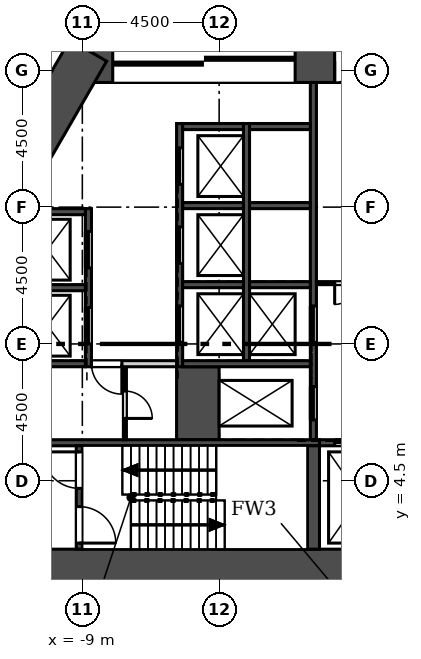
"""IFC4 building model, lengths in metres.
Left out: names, types, materials, properties, quantities, classifications, styles, units other than length and angle.
Written with IfcOpenShell. Run it as: python <this file> out.ifc"""

import sys

from ifc_helpers import new_model, si_unit, direction, frame, frame_2d, origin, place, context, subcontext, project, spatial, rectangle, extrude, element, fill, save


model = new_model("IFC4")
c1 = context("Model", 3, precision=1e-05, world=origin(), true_north=direction((0.0, 1.0)))
c2 = subcontext(c1, "Body", "Model", "MODEL_VIEW")
j1 = project(units=[si_unit("LENGTHUNIT", "METRE"), si_unit("PLANEANGLEUNIT", "RADIAN")], contexts=[c1])
p1 = place(None, origin())
s1 = spatial("IfcSite", under=j1, at=p1, CompositionType="ELEMENT")
p2 = place(p1, origin())
s2 = spatial("IfcBuilding", under=s1, at=p2, CompositionType="ELEMENT")
p3 = place(p2, frame((0.0, 0.0, 88.9)))
s3 = spatial("IfcBuildingStorey", under=s2, at=p3, CompositionType="ELEMENT", Elevation=88.9)
p4 = place(p3, frame((-14.0, 1.55, 0.0), z_axis=(0.0, 0.0, 1.0), x_axis=(1.0, 0.0, 0.0)))
e1 = element("IfcWall", 1, at=p4, inside=s3, PredefinedType="SHEAR", context=c2, shape_type="SweptSolid", body=[
    extrude(rectangle(XDim=28.0, YDim=1.4, at=frame_2d((14.0, 0.0))), origin(), (0.0, 0.0, 1.0), 7.2),
])
p5 = place(p3, frame((9.412, 18.3, 0.0), z_axis=(0.0, 0.0, 1.0), x_axis=(-1.0, 0.0, 0.0)))
e2 = element("IfcWall", 2, at=p5, inside=s3, PredefinedType="SHEAR", context=c2, shape_type="SweptSolid", body=[
    extrude(rectangle(XDim=18.823, YDim=1.4, at=frame_2d((9.412, 0.0))), origin(), (0.0, 0.0, 1.0), 7.2),
])
p6 = place(p5, frame((8.711, 0.0, 0.0)))
e3 = element("IfcOpeningElement", 3, at=p6, cuts=e2, PredefinedType="OPENING", context=c2, shape_type="SweptSolid", body=[
    extrude(rectangle(XDim=1.4, YDim=2.1, at=frame_2d((0.7, 1.05))), frame((0.0, 0.71, 0.0), z_axis=(0.0, -1.0, 0.0), x_axis=(1.0, 0.0, 0.0)), (0.0, 0.0, 1.0), 1.42),
])
p7 = place(p5, frame((11.412, 0.0, 0.0)))
e4 = element("IfcOpeningElement", 4, at=p7, cuts=e2, PredefinedType="OPENING", context=c2, shape_type="SweptSolid", body=[
    extrude(rectangle(XDim=6.0, YDim=2.4, at=frame_2d((3.0, 1.2))), frame((0.0, 0.71, 0.0), z_axis=(0.0, -1.0, 0.0), x_axis=(1.0, 0.0, 0.0)), (0.0, 0.0, 1.0), 1.42),
])
p8 = place(p5, frame((1.412, 0.0, 0.0)))
e5 = element("IfcOpeningElement", 5, at=p8, cuts=e2, PredefinedType="OPENING", context=c2, shape_type="SweptSolid", body=[
    extrude(rectangle(XDim=6.0, YDim=2.4, at=frame_2d((3.0, 1.2))), frame((0.0, 0.71, 0.0), z_axis=(0.0, -1.0, 0.0), x_axis=(1.0, 0.0, 0.0)), (0.0, 0.0, 1.0), 1.42),
])
p9 = place(p3, frame((-8.805, 18.65, 0.0), z_axis=(0.0, 0.0, 1.0), x_axis=(-0.50000187635, -0.866024320471, 0.0)))
e6 = element("IfcWall", 6, at=p9, inside=s3, PredefinedType="SHEAR", context=c2, shape_type="SweptSolid", body=[
    extrude(rectangle(XDim=9.177, YDim=1.4, at=frame_2d((4.588, 0.0))), origin(), (0.0, 0.0, 1.0), 7.2),
])
p10 = place(p3, frame((-4.353, 53.627, 0.0), z_axis=(0.0, 0.0, 1.0), x_axis=(-0.500000400847, -0.866025172355, 0.0)))
e7 = element("IfcWall", 7, at=p10, inside=s3, PredefinedType="SOLIDWALL", context=c2, shape_type="SweptSolid", body=[
    extrude(rectangle(XDim=53.021, YDim=0.34, at=frame_2d((26.51, 0.0))), origin(), (0.0, 0.0, 1.0), 6.8),
])
p11 = place(p3, frame((-8.8, 8.25, -0.3), z_axis=(0.0, 0.0, 1.0), x_axis=(0.0, 1.0, 0.0)))
e8 = element("IfcWall", 8, at=p11, inside=s3, PredefinedType="SOLIDWALL", context=c2, shape_type="SweptSolid", body=[
    extrude(rectangle(XDim=5.2, YDim=0.2, at=frame_2d((2.6, 0.0))), origin(), (0.0, 0.0, 1.0), 7.1),
])
p12 = place(p11, frame((0.75, 0.0, 0.3)))
e9 = element("IfcOpeningElement", 9, at=p12, cuts=e8, PredefinedType="OPENING", context=c2, shape_type="SweptSolid", body=[
    extrude(rectangle(XDim=1.2, YDim=2.1, at=frame_2d((0.6, 1.05))), frame((0.0, 0.11, 0.0), z_axis=(0.0, -1.0, 0.0), x_axis=(1.0, 0.0, 0.0)), (0.0, 0.0, 1.0), 0.22),
])
p13 = place(p11, frame((3.25, 0.0, 0.3)))
e10 = element("IfcOpeningElement", 10, at=p13, cuts=e8, PredefinedType="OPENING", context=c2, shape_type="SweptSolid", body=[
    extrude(rectangle(XDim=1.2, YDim=2.1, at=frame_2d((0.6, 1.05))), frame((0.0, 0.11, 0.0), z_axis=(0.0, -1.0, 0.0), x_axis=(1.0, 0.0, 0.0)), (0.0, 0.0, 1.0), 0.22),
])
p14 = place(p3, frame((-5.8, 8.25, -0.3), z_axis=(0.0, 0.0, 1.0), x_axis=(0.0, 1.0, 0.0)))
e11 = element("IfcWall", 11, at=p14, inside=s3, PredefinedType="SOLIDWALL", context=c2, shape_type="SweptSolid", body=[
    extrude(rectangle(XDim=8.0, YDim=0.2, at=frame_2d((4.0, 0.0))), origin(), (0.0, 0.0, 1.0), 7.1),
])
p15 = place(p14, frame((0.8, 0.0, 0.3)))
e12 = element("IfcOpeningElement", 12, at=p15, cuts=e11, PredefinedType="OPENING", context=c2, shape_type="SweptSolid", body=[
    extrude(rectangle(XDim=1.2, YDim=2.1, at=frame_2d((0.6, 1.05))), frame((0.0, 0.11, 0.0), z_axis=(0.0, -1.0, 0.0), x_axis=(1.0, 0.0, 0.0)), (0.0, 0.0, 1.0), 0.22),
])
p16 = place(p14, frame((3.4, 0.0, 0.3)))
e13 = element("IfcOpeningElement", 13, at=p16, cuts=e11, PredefinedType="OPENING", context=c2, shape_type="SweptSolid", body=[
    extrude(rectangle(XDim=1.2, YDim=2.1, at=frame_2d((0.6, 1.05))), frame((0.0, 0.11, 0.0), z_axis=(0.0, -1.0, 0.0), x_axis=(1.0, 0.0, 0.0)), (0.0, 0.0, 1.0), 0.22),
])
p17 = place(p14, frame((6.0, 0.0, 0.3)))
e14 = element("IfcOpeningElement", 14, at=p17, cuts=e11, PredefinedType="OPENING", context=c2, shape_type="SweptSolid", body=[
    extrude(rectangle(XDim=1.2, YDim=2.1, at=frame_2d((0.6, 1.05))), frame((0.0, 0.11, 0.0), z_axis=(0.0, -1.0, 0.0), x_axis=(1.0, 0.0, 0.0)), (0.0, 0.0, 1.0), 0.22),
])
p18 = place(p3, frame((-3.6, 8.45, -0.3), z_axis=(0.0, 0.0, 1.0), x_axis=(0.0, 1.0, 0.0)))
e15 = element("IfcWall", 15, at=p18, inside=s3, PredefinedType="SOLIDWALL", context=c2, shape_type="SweptSolid", body=[
    extrude(rectangle(XDim=7.8, YDim=0.2, at=frame_2d((3.9, 0.0))), origin(), (0.0, 0.0, 1.0), 7.1),
])
p19 = place(p3, frame((-1.4, 5.85, -0.3), z_axis=(0.0, 0.0, 1.0), x_axis=(0.0, 1.0, 0.0)))
e16 = element("IfcWall", 16, at=p19, inside=s3, PredefinedType="SOLIDWALL", context=c2, shape_type="SweptSolid", body=[
    extrude(rectangle(XDim=11.75, YDim=0.2, at=frame_2d((5.875, 0.0))), origin(), (0.0, 0.0, 1.0), 7.1),
])
p20 = place(p19, frame((3.2, 0.0, 0.3)))
e17 = element("IfcOpeningElement", 17, at=p20, cuts=e16, PredefinedType="OPENING", context=c2, shape_type="SweptSolid", body=[
    extrude(rectangle(XDim=1.2, YDim=2.1, at=frame_2d((0.6, 1.05))), frame((0.0, 0.11, 0.0), z_axis=(0.0, -1.0, 0.0), x_axis=(1.0, 0.0, 0.0)), (0.0, 0.0, 1.0), 0.22),
])
p21 = place(p19, frame((0.65, 0.0, 0.3)))
e18 = element("IfcOpeningElement", 18, at=p21, cuts=e16, PredefinedType="OPENING", context=c2, shape_type="SweptSolid", body=[
    extrude(rectangle(XDim=1.1, YDim=2.1, at=frame_2d((0.55, 1.05))), frame((0.0, 0.11, 0.0), z_axis=(0.0, -1.0, 0.0), x_axis=(1.0, 0.0, 0.0)), (0.0, 0.0, 1.0), 0.22),
])
p22 = place(p3, frame((-5.2, 5.85, -0.3), z_axis=(0.0, 0.0, 1.0), x_axis=(0.0, 1.0, 0.0)))
e19 = element("IfcWall", 19, at=p22, inside=s3, PredefinedType="SOLIDWALL", context=c2, shape_type="SweptSolid", body=[
    extrude(rectangle(XDim=2.4, YDim=1.4, at=frame_2d((1.2, 0.0))), origin(), (0.0, 0.0, 1.0), 7.1),
])
p23 = place(p3, frame((-10.9, 8.35, -0.3), z_axis=(0.0, 0.0, 1.0), x_axis=(1.0, 0.0, 0.0)))
e20 = element("IfcWall", 20, at=p23, inside=s3, PredefinedType="SOLIDWALL", context=c2, shape_type="SweptSolid", body=[
    extrude(rectangle(XDim=2.0, YDim=0.2, at=frame_2d((1.0, 0.0))), origin(), (0.0, 0.0, 1.0), 7.1),
])
p24 = place(p3, frame((-5.7, 8.35, -0.3), z_axis=(0.0, 0.0, 1.0), x_axis=(1.0, 0.0, 0.0)))
e21 = element("IfcWall", 21, at=p24, inside=s3, PredefinedType="SOLIDWALL", context=c2, shape_type="SweptSolid", body=[
    extrude(rectangle(XDim=4.2, YDim=0.2, at=frame_2d((2.1, 0.0))), origin(), (0.0, 0.0, 1.0), 7.1),
])
p25 = place(p3, frame((-12.6, 5.75, -0.3), z_axis=(0.0, 0.0, 1.0), x_axis=(1.0, 0.0, 0.0)))
e22 = element("IfcWall", 22, at=p25, inside=s3, PredefinedType="SOLIDWALL", context=c2, shape_type="SweptSolid", body=[
    extrude(rectangle(XDim=11.4, YDim=0.2, at=frame_2d((5.7, 0.0))), origin(), (0.0, 0.0, 1.0), 7.1),
])
p26 = place(p3, frame((-1.2, 5.75, -0.3), z_axis=(0.0, 0.0, 1.0), x_axis=(1.0, 0.0, 0.0)))
e23 = element("IfcWall", 23, at=p26, inside=s3, PredefinedType="SOLIDWALL", context=c2, shape_type="SweptSolid", body=[
    extrude(rectangle(XDim=2.4, YDim=0.2, at=frame_2d((1.2, 0.0))), origin(), (0.0, 0.0, 1.0), 7.1),
])
p27 = place(p26, frame((0.5, 0.0, 0.3)))
e24 = element("IfcOpeningElement", 24, at=p27, cuts=e23, PredefinedType="OPENING", context=c2, shape_type="SweptSolid", body=[
    extrude(rectangle(XDim=1.4, YDim=2.1, at=frame_2d((0.7, 1.05))), frame((0.0, 0.11, 0.0), z_axis=(0.0, -1.0, 0.0), x_axis=(1.0, 0.0, 0.0)), (0.0, 0.0, 1.0), 0.22),
])
p28 = place(p3, frame((-9.1, 2.25, -0.3), z_axis=(0.0, 0.0, 1.0), x_axis=(0.0, 1.0, 0.0)))
e25 = element("IfcWall", 25, at=p28, inside=s3, PredefinedType="SOLIDWALL", context=c2, shape_type="SweptSolid", body=[
    extrude(rectangle(XDim=3.4, YDim=0.2, at=frame_2d((1.7, 0.0))), origin(), (0.0, 0.0, 1.0), 7.1),
])
p29 = place(p28, frame((0.2, 0.0, 0.3)))
e26 = element("IfcOpeningElement", 26, at=p29, cuts=e25, PredefinedType="OPENING", context=c2, shape_type="SweptSolid", body=[
    extrude(rectangle(XDim=1.2, YDim=2.1, at=frame_2d((0.6, 1.05))), frame((0.0, 0.11, 0.0), z_axis=(0.0, -1.0, 0.0), x_axis=(1.0, 0.0, 0.0)), (0.0, 0.0, 1.0), 0.22),
])
p30 = place(p28, frame((2.0, 0.0, 0.3)))
e27 = element("IfcOpeningElement", 27, at=p30, cuts=e25, PredefinedType="OPENING", context=c2, shape_type="SweptSolid", body=[
    extrude(rectangle(XDim=1.2, YDim=2.1, at=frame_2d((0.6, 1.05))), frame((0.0, 0.11, 0.0), z_axis=(0.0, -1.0, 0.0), x_axis=(1.0, 0.0, 0.0)), (0.0, 0.0, 1.0), 0.22),
])
p31 = place(p3, frame((-1.4, 2.25, -0.3), z_axis=(0.0, 0.0, 1.0), x_axis=(0.0, 1.0, 0.0)))
e28 = element("IfcWall", 28, at=p31, inside=s3, PredefinedType="SOLIDWALL", context=c2, shape_type="SweptSolid", body=[
    extrude(rectangle(XDim=3.4, YDim=0.4, at=frame_2d((1.7, 0.0))), origin(), (0.0, 0.0, 1.0), 7.1),
])
for number, where, z_axis, x_axis in (
    (29, (-10.9, 10.85, -0.3), (0.0, 0.0, 1.0), (1.0, 0.0, 0.0)),
    (30, (-10.9, 13.35, -0.3), (0.0, 0.0, 1.0), (1.0, 0.0, 0.0)),
    (31, (-5.7, 10.95, -0.3), (0.0, 0.0, 1.0), (1.0, 0.0, 0.0)),
    (32, (-5.7, 13.55, -0.3), (0.0, 0.0, 1.0), (1.0, 0.0, 0.0)),
    (33, (-5.7, 16.15, -0.3), (0.0, 0.0, 1.0), (1.0, 0.0, 0.0)),
    (34, (-3.5, 10.95, -0.3), (0.0, 0.0, 1.0), (1.0, 0.0, 0.0)),
    (35, (-3.5, 13.55, -0.3), (0.0, 0.0, 1.0), (1.0, 0.0, 0.0)),
    (36, (-3.5, 16.15, -0.3), (0.0, 0.0, 1.0), (1.0, 0.0, 0.0)),
):
    element("IfcWall", number, at=place(p3, frame(where, z_axis=z_axis, x_axis=x_axis)), inside=s3, PredefinedType="SOLIDWALL", context=c2, shape_type="SweptSolid", body=[
        extrude(rectangle(XDim=2.0, YDim=0.2, at=frame_2d((1.0, 0.0))), origin(), (0.0, 0.0, 1.0), 7.1),
    ])
p32 = place(p3, frame((-7.6, 5.85, 0.0), z_axis=(0.0, 0.0, 1.0), x_axis=(0.0, 1.0, 0.0)))
e37 = element("IfcWall", 37, at=p32, inside=s3, PredefinedType="PARTITIONING", context=c2, shape_type="SweptSolid", body=[
    extrude(rectangle(XDim=2.4, YDim=0.1, at=frame_2d((1.2, 0.0))), origin(), (0.0, 0.0, 1.0), 6.8),
])
p33 = place(p32, frame((0.7, 0.0, 0.0)))
e38 = element("IfcOpeningElement", 38, at=p33, cuts=e37, PredefinedType="OPENING", context=c2, shape_type="SweptSolid", body=[
    extrude(rectangle(XDim=0.9, YDim=2.1, at=frame_2d((0.45, 1.05))), frame((0.0, 0.06, 0.0), z_axis=(0.0, -1.0, 0.0), x_axis=(1.0, 0.0, 0.0)), (0.0, 0.0, 1.0), 0.12),
])
p34 = place(p3, frame((-8.7, 8.35, 0.0), z_axis=(0.0, 0.0, 1.0), x_axis=(1.0, 0.0, 0.0)))
e39 = element("IfcWall", 39, at=p34, inside=s3, PredefinedType="SOLIDWALL", context=c2, shape_type="SweptSolid", body=[
    extrude(rectangle(XDim=2.8, YDim=0.2, at=frame_2d((1.4, 0.0))), origin(), (0.0, 0.0, 1.0), 6.8),
])
p35 = place(p34, origin())
e40 = element("IfcOpeningElement", 40, at=p35, cuts=e39, PredefinedType="OPENING", context=c2, shape_type="SweptSolid", body=[
    extrude(rectangle(XDim=1.0, YDim=2.1, at=frame_2d((0.5, 1.05))), frame((0.0, 0.11, 0.0), z_axis=(0.0, -1.0, 0.0), x_axis=(1.0, 0.0, 0.0)), (0.0, 0.0, 1.0), 0.22),
])
p36 = place(p3, frame((-1.3, 11.0, 0.0), z_axis=(0.0, 0.0, 1.0), x_axis=(1.0, 0.0, 0.0)))
e41 = element("IfcWall", 41, at=p36, inside=s3, PredefinedType="PARTITIONING", context=c2, shape_type="SweptSolid", body=[
    extrude(rectangle(XDim=2.6, YDim=0.1, at=frame_2d((1.3, 0.0))), origin(), (0.0, 0.0, 1.0), 6.8),
])
p37 = place(p36, frame((0.6, 0.0, 0.0)))
e42 = element("IfcOpeningElement", 42, at=p37, cuts=e41, PredefinedType="OPENING", context=c2, shape_type="SweptSolid", body=[
    extrude(rectangle(XDim=1.4, YDim=2.1, at=frame_2d((0.7, 1.05))), frame((0.0, 0.06, 0.0), z_axis=(0.0, -1.0, 0.0), x_axis=(1.0, 0.0, 0.0)), (0.0, 0.0, 1.0), 0.12),
])
p38 = place(p3, frame((-9.0, 3.95, 0.0), z_axis=(0.0, 0.0, 1.0), x_axis=(1.0, 0.0, 0.0)))
e43 = element("IfcWall", 43, at=p38, inside=s3, PredefinedType="SOLIDWALL", context=c2, shape_type="SweptSolid", body=[
    extrude(rectangle(XDim=1.6, YDim=0.2, at=frame_2d((0.8, 0.0))), origin(), (0.0, 0.0, 1.0), 6.8),
])
p39 = place(p12, origin())
e44 = element("IfcDoor", 44, at=p39, inside=s3, OperationType="SLIDING_TO_LEFT", PredefinedType="DOOR", context=c2, shape_type="SweptSolid", body=[
    extrude(rectangle(XDim=1.2, YDim=2.1, at=frame_2d((0.6, 1.05))), frame((0.0, 0.025, 0.0), z_axis=(0.0, -1.0, 0.0), x_axis=(1.0, 0.0, 0.0)), (0.0, 0.0, 1.0), 0.05),
])
fill(e9, e44)
p40 = place(p13, origin())
e45 = element("IfcDoor", 45, at=p40, inside=s3, OperationType="SLIDING_TO_LEFT", PredefinedType="DOOR", context=c2, shape_type="SweptSolid", body=[
    extrude(rectangle(XDim=1.2, YDim=2.1, at=frame_2d((0.6, 1.05))), frame((0.0, 0.025, 0.0), z_axis=(0.0, -1.0, 0.0), x_axis=(1.0, 0.0, 0.0)), (0.0, 0.0, 1.0), 0.05),
])
fill(e10, e45)
p41 = place(p15, origin())
e46 = element("IfcDoor", 46, at=p41, inside=s3, OperationType="SLIDING_TO_LEFT", PredefinedType="DOOR", context=c2, shape_type="SweptSolid", body=[
    extrude(rectangle(XDim=1.2, YDim=2.1, at=frame_2d((0.6, 1.05))), frame((0.0, 0.025, 0.0), z_axis=(0.0, -1.0, 0.0), x_axis=(1.0, 0.0, 0.0)), (0.0, 0.0, 1.0), 0.05),
])
fill(e12, e46)
p42 = place(p16, origin())
e47 = element("IfcDoor", 47, at=p42, inside=s3, OperationType="SLIDING_TO_LEFT", PredefinedType="DOOR", context=c2, shape_type="SweptSolid", body=[
    extrude(rectangle(XDim=1.2, YDim=2.1, at=frame_2d((0.6, 1.05))), frame((0.0, 0.025, 0.0), z_axis=(0.0, -1.0, 0.0), x_axis=(1.0, 0.0, 0.0)), (0.0, 0.0, 1.0), 0.05),
])
fill(e13, e47)
p43 = place(p17, origin())
e48 = element("IfcDoor", 48, at=p43, inside=s3, OperationType="SLIDING_TO_LEFT", PredefinedType="DOOR", context=c2, shape_type="SweptSolid", body=[
    extrude(rectangle(XDim=1.2, YDim=2.1, at=frame_2d((0.6, 1.05))), frame((0.0, 0.025, 0.0), z_axis=(0.0, -1.0, 0.0), x_axis=(1.0, 0.0, 0.0)), (0.0, 0.0, 1.0), 0.05),
])
fill(e14, e48)
p44 = place(p20, origin())
e49 = element("IfcDoor", 49, at=p44, inside=s3, OperationType="SLIDING_TO_LEFT", PredefinedType="DOOR", context=c2, shape_type="SweptSolid", body=[
    extrude(rectangle(XDim=1.2, YDim=2.1, at=frame_2d((0.6, 1.05))), frame((0.0, 0.025, 0.0), z_axis=(0.0, -1.0, 0.0), x_axis=(1.0, 0.0, 0.0)), (0.0, 0.0, 1.0), 0.05),
])
fill(e17, e49)
p45 = place(p21, origin())
e50 = element("IfcDoor", 50, at=p45, inside=s3, OperationType="SLIDING_TO_RIGHT", PredefinedType="DOOR", context=c2, shape_type="SweptSolid", body=[
    extrude(rectangle(XDim=1.1, YDim=2.1, at=frame_2d((0.55, 1.05))), frame((0.0, 0.025, 0.0), z_axis=(0.0, -1.0, 0.0), x_axis=(1.0, 0.0, 0.0)), (0.0, 0.0, 1.0), 0.05),
])
fill(e18, e50)
p46 = place(p27, origin())
e51 = element("IfcDoor", 51, at=p46, inside=s3, OperationType="SLIDING_TO_LEFT", PredefinedType="DOOR", context=c2, shape_type="SweptSolid", body=[
    extrude(rectangle(XDim=1.4, YDim=2.1, at=frame_2d((0.7, 1.05))), frame((0.0, 0.025, 0.0), z_axis=(0.0, -1.0, 0.0), x_axis=(1.0, 0.0, 0.0)), (0.0, 0.0, 1.0), 0.05),
])
fill(e24, e51)
p47 = place(p35, frame((1.0, 0.0, 0.0), z_axis=(0.0, 0.0, 1.0), x_axis=(-1.0, 0.0, 0.0)))
e52 = element("IfcDoor", 52, at=p47, inside=s3, OperationType="SINGLE_SWING_LEFT", PredefinedType="DOOR", context=c2, shape_type="SweptSolid", body=[
    extrude(rectangle(XDim=1.0, YDim=2.1, at=frame_2d((0.5, 1.05))), frame((0.0, 0.025, 0.0), z_axis=(0.0, -1.0, 0.0), x_axis=(1.0, 0.0, 0.0)), (0.0, 0.0, 1.0), 0.05),
])
fill(e40, e52)
p48 = place(p33, frame((0.9, 0.0, 0.0), z_axis=(0.0, 0.0, 1.0), x_axis=(-1.0, 0.0, 0.0)))
e53 = element("IfcDoor", 53, at=p48, inside=s3, OperationType="SINGLE_SWING_RIGHT", PredefinedType="DOOR", context=c2, shape_type="SweptSolid", body=[
    extrude(rectangle(XDim=0.9, YDim=2.1, at=frame_2d((0.45, 1.05))), frame((0.0, 0.025, 0.0), z_axis=(0.0, -1.0, 0.0), x_axis=(1.0, 0.0, 0.0)), (0.0, 0.0, 1.0), 0.05),
])
fill(e38, e53)
p49 = place(p29, frame((1.2, 0.0, 0.0), z_axis=(0.0, 0.0, 1.0), x_axis=(-1.0, 0.0, 0.0)))
e54 = element("IfcDoor", 54, at=p49, inside=s3, OperationType="SINGLE_SWING_RIGHT", PredefinedType="DOOR", context=c2, shape_type="SweptSolid", body=[
    extrude(rectangle(XDim=1.2, YDim=2.1, at=frame_2d((0.6, 1.05))), frame((0.0, 0.025, 0.0), z_axis=(0.0, -1.0, 0.0), x_axis=(1.0, 0.0, 0.0)), (0.0, 0.0, 1.0), 0.05),
])
fill(e26, e54)
p50 = place(p37, frame((1.4, 0.0, 0.0), z_axis=(0.0, 0.0, 1.0), x_axis=(-1.0, 0.0, 0.0)))
e55 = element("IfcDoor", 55, at=p50, inside=s3, OperationType="DOUBLE_DOOR_SINGLE_SWING", PredefinedType="DOOR", context=c2, shape_type="SweptSolid", body=[
    extrude(rectangle(XDim=1.4, YDim=2.1, at=frame_2d((0.7, 1.05))), frame((0.0, 0.025, 0.0), z_axis=(0.0, -1.0, 0.0), x_axis=(1.0, 0.0, 0.0)), (0.0, 0.0, 1.0), 0.05),
])
fill(e42, e55)
p51 = place(p6, origin())
e56 = element("IfcDoor", 56, at=p51, inside=s3, OperationType="DOUBLE_DOOR_SINGLE_SWING", PredefinedType="DOOR", context=c2, shape_type="SweptSolid", body=[
    extrude(rectangle(XDim=1.4, YDim=2.1, at=frame_2d((0.7, 1.05))), frame((0.0, 0.025, 0.0), z_axis=(0.0, -1.0, 0.0), x_axis=(1.0, 0.0, 0.0)), (0.0, 0.0, 1.0), 0.05),
])
fill(e3, e56)
p52 = place(p7, origin())
e57 = element("IfcDoor", 57, at=p52, inside=s3, OperationType="DOUBLE_DOOR_SLIDING", PredefinedType="DOOR", context=c2, shape_type="SweptSolid", body=[
    extrude(rectangle(XDim=6.0, YDim=2.4, at=frame_2d((3.0, 1.2))), frame((0.0, 0.025, 0.0), z_axis=(0.0, -1.0, 0.0), x_axis=(1.0, 0.0, 0.0)), (0.0, 0.0, 1.0), 0.05),
])
fill(e4, e57)
p53 = place(p30, origin())
e58 = element("IfcDoor", 58, at=p53, inside=s3, OperationType="SINGLE_SWING_RIGHT", PredefinedType="DOOR", context=c2, shape_type="SweptSolid", body=[
    extrude(rectangle(XDim=1.2, YDim=2.1, at=frame_2d((0.6, 1.05))), frame((0.0, 0.025, 0.0), z_axis=(0.0, -1.0, 0.0), x_axis=(1.0, 0.0, 0.0)), (0.0, 0.0, 1.0), 0.05),
])
fill(e27, e58)
save(model, sys.argv[1])
